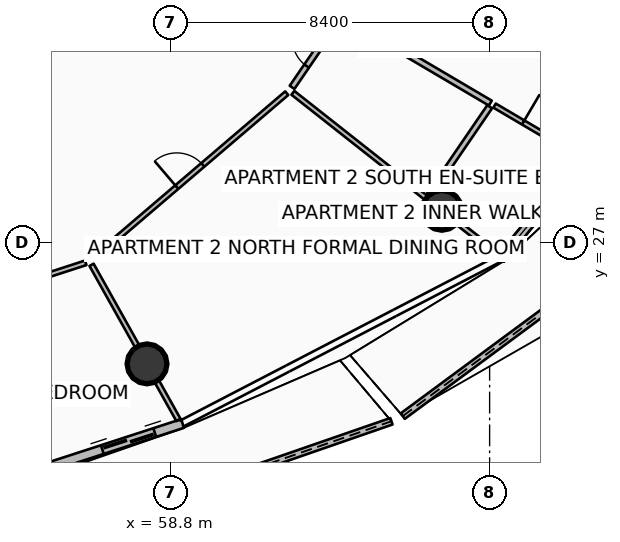
"""IFC4 building model, lengths in metres.
Left out: names, types, materials, properties, quantities, classifications, styles, units other than length and angle.
Written with IfcOpenShell. Run it as: python <this file> out.ifc"""

import sys

from ifc_helpers import new_model, si_unit, direction, frame, frame_2d, origin, origin_2d, place, context, subcontext, project, spatial, polyline, rectangle, circle, outline, extrude, element, fill, save


model = new_model("IFC4")
c1 = context("Model", 3, precision=1e-05, world=origin(), true_north=direction((0.0, 1.0)))
c2 = subcontext(c1, "Body", "Model", "MODEL_VIEW")
j1 = project(units=[si_unit("LENGTHUNIT", "METRE"), si_unit("PLANEANGLEUNIT", "RADIAN")], contexts=[c1])
p1 = place(None, origin())
s1 = spatial("IfcSite", under=j1, at=p1, CompositionType="ELEMENT")
p2 = place(p1, origin())
s2 = spatial("IfcBuilding", under=s1, at=p2, CompositionType="ELEMENT")
p3 = place(p2, frame((0.0, 0.0, 214.05)))
s3 = spatial("IfcBuildingStorey", under=s2, at=p3, CompositionType="ELEMENT", Elevation=214.05)
for number, where, z_axis, x_axis in (
    (1, (58.185, 23.814, 0.0), (0.0, 0.0, 1.0), (1.0, 0.0, 0.0)),
    (2, (65.944, 27.854, 0.0), (0.0, 0.0, 1.0), (1.0, 0.0, 0.0)),
):
    element("IfcColumn", number, at=place(p3, frame(where, z_axis=z_axis, x_axis=x_axis)), inside=s3, PredefinedType="COLUMN", context=c2, shape_type="SweptSolid", body=[
        extrude(circle(Radius=0.525, at=origin_2d()), origin(), (0.0, 0.0, 1.0), 3.5),
    ])
p4 = place(p3, frame((55.547, 19.162, 0.0), z_axis=(0.0, 0.0, 1.0), x_axis=(0.944943422405, 0.327233752007, 0.0)))
e3 = element("IfcWall", 3, at=p4, inside=s3, PredefinedType="PARAPET", context=c2, shape_type="SweptSolid", body=[
    extrude(outline(polyline([(0.0, 0.0), (9.597, 0.0), (9.598, 1.483), (4.799, 1.284), (0.0, 1.148), (0.0, 0.0)])), frame((0.0, 0.09, 0.0), z_axis=(0.0, -1.0, 0.0), x_axis=(1.0, 0.0, 0.0)), (0.0, 0.0, 1.0), 0.18),
])
p5 = place(p3, frame((64.914, 22.439, 0.0), z_axis=(0.0, 0.0, 1.0), x_axis=(0.804266043661, 0.594269409454, 0.0)))
e4 = element("IfcWall", 4, at=p5, inside=s3, PredefinedType="PARAPET", context=c2, shape_type="SweptSolid", body=[
    extrude(outline(polyline([(0.0, 0.0), (10.778, 0.0), (10.778, 1.832), (5.389, 1.696), (0.0, 1.497), (0.0, 0.0)])), frame((0.0, 0.09, 0.0), z_axis=(0.0, -1.0, 0.0), x_axis=(1.0, 0.0, 0.0)), (0.0, 0.0, 1.0), 0.18),
])
p6 = place(p3, frame((50.616, 19.481, 0.0), z_axis=(0.0, 0.0, 1.0), x_axis=(0.951058543936, 0.309010753869, 0.0)))
e5 = element("IfcWall", 5, at=p6, inside=s3, PredefinedType="SOLIDWALL", context=c2, shape_type="SweptSolid", body=[
    extrude(rectangle(XDim=8.942, YDim=0.24, at=frame_2d((4.471, 0.0))), origin(), (0.0, 0.0, 1.0), 2.45),
])
p7 = place(p6, frame((6.722, 0.0, 0.0)))
e6 = element("IfcOpeningElement", 6, at=p7, cuts=e5, PredefinedType="OPENING", context=c2, shape_type="SweptSolid", body=[
    extrude(rectangle(XDim=1.45, YDim=2.15, at=frame_2d((0.725, 1.075))), frame((0.0, 0.13, 0.0), z_axis=(0.0, -1.0, 0.0), x_axis=(1.0, 0.0, 0.0)), (0.0, 0.0, 1.0), 0.26),
])
p8 = place(p6, frame((0.28, 0.0, 0.65)))
e7 = element("IfcOpeningElement", 7, at=p8, cuts=e5, PredefinedType="OPENING", context=c2, shape_type="SweptSolid", body=[
    extrude(rectangle(XDim=1.6, YDim=1.5, at=frame_2d((0.8, 0.75))), frame((0.0, 0.13, 0.0), z_axis=(0.0, -1.0, 0.0), x_axis=(1.0, 0.0, 0.0)), (0.0, 0.0, 1.0), 0.26),
])
p9 = place(p3, frame((67.485, 26.576, 0.0), z_axis=(0.0, 0.0, 1.0), x_axis=(0.636759394418, 0.771062561418, 0.0)))
e8 = element("IfcWall", 8, at=p9, inside=s3, PredefinedType="SOLIDWALL", context=c2, shape_type="SweptSolid", body=[
    extrude(rectangle(XDim=10.494, YDim=0.24, at=frame_2d((5.247, 0.0))), origin(), (0.0, 0.0, 1.0), 2.45),
])
p10 = place(p9, frame((8.274, 0.0, 0.0)))
e9 = element("IfcOpeningElement", 9, at=p10, cuts=e8, PredefinedType="OPENING", context=c2, shape_type="SweptSolid", body=[
    extrude(rectangle(XDim=1.45, YDim=2.15, at=frame_2d((0.725, 1.075))), frame((0.0, 0.13, 0.0), z_axis=(0.0, -1.0, 0.0), x_axis=(1.0, 0.0, 0.0)), (0.0, 0.0, 1.0), 0.26),
])
p11 = place(p9, frame((0.28, 0.0, 0.65)))
e10 = element("IfcOpeningElement", 10, at=p11, cuts=e8, PredefinedType="OPENING", context=c2, shape_type="SweptSolid", body=[
    extrude(rectangle(XDim=1.6, YDim=1.5, at=frame_2d((0.8, 0.75))), frame((0.0, 0.13, 0.0), z_axis=(0.0, -1.0, 0.0), x_axis=(1.0, 0.0, 0.0)), (0.0, 0.0, 1.0), 0.26),
])
p12 = place(p3, frame((50.192, 24.4, 0.0), z_axis=(0.0, 0.0, 1.0), x_axis=(0.951057868445, 0.309012832854, 0.0)))
e11 = element("IfcWall", 11, at=p12, inside=s3, PredefinedType="PARTITIONING", context=c2, shape_type="SweptSolid", body=[
    extrude(rectangle(XDim=6.708, YDim=0.125, at=frame_2d((3.354, 0.0))), origin(), (0.0, 0.0, 1.0), 2.94),
])
p13 = place(p12, frame((2.904, 0.0, 0.0)))
e12 = element("IfcOpeningElement", 12, at=p13, cuts=e11, PredefinedType="OPENING", context=c2, shape_type="SweptSolid", body=[
    extrude(rectangle(XDim=0.9, YDim=2.08, at=frame_2d((0.45, 1.04))), frame((0.0, 0.073, 0.0), z_axis=(0.0, -1.0, 0.0), x_axis=(1.0, 0.0, 0.0)), (0.0, 0.0, 1.0), 0.145),
])
p14 = place(p3, frame((56.725, 26.42, 0.0), z_axis=(0.0, 0.0, 1.0), x_axis=(0.488595423778, -0.872510465189, 0.0)))
e13 = element("IfcWall", 13, at=p14, inside=s3, PredefinedType="PARTITIONING", context=c2, shape_type="SweptSolid", body=[
    extrude(rectangle(XDim=4.678, YDim=0.125, at=frame_2d((2.339, 0.0))), origin(), (0.0, 0.0, 1.0), 2.94),
])
p15 = place(p3, frame((56.76, 26.579, 0.0), z_axis=(0.0, 0.0, 1.0), x_axis=(0.760424223761, 0.649426670161, 0.0)))
e14 = element("IfcWall", 14, at=p15, inside=s3, PredefinedType="PARTITIONING", context=c2, shape_type="SweptSolid", body=[
    extrude(rectangle(XDim=6.708, YDim=0.125, at=frame_2d((3.354, 0.0))), origin(), (0.0, 0.0, 1.0), 2.94),
])
p16 = place(p15, frame((2.904, 0.0, 0.0)))
e15 = element("IfcOpeningElement", 15, at=p16, cuts=e14, PredefinedType="OPENING", context=c2, shape_type="SweptSolid", body=[
    extrude(rectangle(XDim=0.9, YDim=2.08, at=frame_2d((0.45, 1.04))), frame((0.0, 0.073, 0.0), z_axis=(0.0, -1.0, 0.0), x_axis=(1.0, 0.0, 0.0)), (0.0, 0.0, 1.0), 0.145),
])
p17 = place(p3, frame((62.023, 30.945, 0.0), z_axis=(0.0, 0.0, 1.0), x_axis=(0.785321889756, -0.619087658955, 0.0)))
e16 = element("IfcWall", 16, at=p17, inside=s3, PredefinedType="PARTITIONING", context=c2, shape_type="SweptSolid", body=[
    extrude(rectangle(XDim=6.97, YDim=0.125, at=frame_2d((3.485, 0.0))), origin(), (0.0, 0.0, 1.0), 2.94),
])
p18 = place(p3, frame((62.001, 31.089, 0.0), z_axis=(0.0, 0.0, 1.0), x_axis=(0.564616496688, 0.825353385931, 0.0)))
e17 = element("IfcWall", 17, at=p18, inside=s3, PredefinedType="PARTITIONING", context=c2, shape_type="SweptSolid", body=[
    extrude(rectangle(XDim=2.207, YDim=0.15, at=frame_2d((1.104, 0.0))), origin(), (0.0, 0.0, 1.0), 2.94),
])
p19 = place(p18, frame((0.678, 0.0, 0.0)))
e18 = element("IfcOpeningElement", 18, at=p19, cuts=e17, PredefinedType="OPENING", context=c2, shape_type="SweptSolid", body=[
    extrude(rectangle(XDim=0.85, YDim=2.06, at=frame_2d((0.425, 1.03))), frame((0.0, 0.085, 0.0), z_axis=(0.0, -1.0, 0.0), x_axis=(1.0, 0.0, 0.0)), (0.0, 0.0, 1.0), 0.17),
])
p20 = place(p3, frame((65.606, 28.248, 0.0), z_axis=(0.0, 0.0, 1.0), x_axis=(0.564646756592, 0.825332684601, 0.0)))
e19 = element("IfcWall", 19, at=p20, inside=s3, PredefinedType="PARTITIONING", context=c2, shape_type="SweptSolid", body=[
    extrude(rectangle(XDim=2.826, YDim=0.15, at=frame_2d((1.413, 0.0))), origin(), (0.0, 0.0, 1.0), 2.94),
])
p21 = place(p3, frame((63.376, 32.939, 0.0), z_axis=(0.0, 0.0, 1.0), x_axis=(0.86154273728, -0.507685051819, 0.0)))
e20 = element("IfcWall", 20, at=p21, inside=s3, PredefinedType="PARTITIONING", context=c2, shape_type="SweptSolid", body=[
    extrude(rectangle(XDim=4.46, YDim=0.15, at=frame_2d((2.23, 0.0))), origin(), (0.0, 0.0, 1.0), 2.94),
])
p22 = place(p3, frame((67.33, 30.609, 0.0), z_axis=(0.0, 0.0, 1.0), x_axis=(0.861581059631, -0.507620013085, 0.0)))
e21 = element("IfcWall", 21, at=p22, inside=s3, PredefinedType="PARTITIONING", context=c2, shape_type="SweptSolid", body=[
    extrude(rectangle(XDim=2.596, YDim=0.125, at=frame_2d((1.298, 0.0))), origin(), (0.0, 0.0, 1.0), 2.94),
])
p23 = place(p22, frame((0.873, 0.0, 0.0)))
e22 = element("IfcOpeningElement", 22, at=p23, cuts=e21, PredefinedType="OPENING", context=c2, shape_type="SweptSolid", body=[
    extrude(rectangle(XDim=0.85, YDim=2.06, at=frame_2d((0.425, 1.03))), frame((0.0, 0.073, 0.0), z_axis=(0.0, -1.0, 0.0), x_axis=(1.0, 0.0, 0.0)), (0.0, 0.0, 1.0), 0.145),
])
p24 = place(p3, frame((64.412, 34.989, 0.0), z_axis=(0.0, 0.0, 1.0), x_axis=(0.919622074899, -0.392804327061, 0.0)))
e23 = element("IfcWall", 23, at=p24, inside=s3, PredefinedType="PARTITIONING", context=c2, shape_type="SweptSolid", body=[
    extrude(rectangle(XDim=7.93, YDim=0.125, at=frame_2d((3.965, 0.0))), origin(), (0.0, 0.0, 1.0), 2.94),
])
p25 = place(p7, origin())
e24 = element("IfcDoor", 24, at=p25, inside=s3, OperationType="DOUBLE_DOOR_SLIDING", PredefinedType="DOOR", context=c2, shape_type="SweptSolid", body=[
    extrude(rectangle(XDim=1.45, YDim=2.15, at=frame_2d((0.725, 1.075))), frame((0.0, 0.025, 0.0), z_axis=(0.0, -1.0, 0.0), x_axis=(1.0, 0.0, 0.0)), (0.0, 0.0, 1.0), 0.05),
])
fill(e6, e24)
p26 = place(p11, origin())
e25 = element("IfcWindow", 25, at=p26, inside=s3, PartitioningType="SINGLE_PANEL", PredefinedType="WINDOW", context=c2, shape_type="SweptSolid", body=[
    extrude(rectangle(XDim=1.6, YDim=1.5, at=frame_2d((0.8, 0.75))), frame((0.0, 0.03, 0.0), z_axis=(0.0, -1.0, 0.0), x_axis=(1.0, 0.0, 0.0)), (0.0, 0.0, 1.0), 0.06),
])
fill(e10, e25)
p27 = place(p16, origin())
e26 = element("IfcDoor", 26, at=p27, inside=s3, OperationType="SINGLE_SWING_LEFT", PredefinedType="DOOR", context=c2, shape_type="SweptSolid", body=[
    extrude(rectangle(XDim=0.9, YDim=2.08, at=frame_2d((0.45, 1.04))), frame((0.0, 0.025, 0.0), z_axis=(0.0, -1.0, 0.0), x_axis=(1.0, 0.0, 0.0)), (0.0, 0.0, 1.0), 0.05),
])
fill(e15, e26)
p28 = place(p19, origin())
e27 = element("IfcDoor", 27, at=p28, inside=s3, OperationType="SINGLE_SWING_RIGHT", PredefinedType="DOOR", context=c2, shape_type="SweptSolid", body=[
    extrude(rectangle(XDim=0.85, YDim=2.06, at=frame_2d((0.425, 1.03))), frame((0.0, 0.025, 0.0), z_axis=(0.0, -1.0, 0.0), x_axis=(1.0, 0.0, 0.0)), (0.0, 0.0, 1.0), 0.05),
])
fill(e18, e27)
p29 = place(p23, origin())
e28 = element("IfcDoor", 28, at=p29, inside=s3, OperationType="SINGLE_SWING_LEFT", PredefinedType="DOOR", context=c2, shape_type="SweptSolid", body=[
    extrude(rectangle(XDim=0.85, YDim=2.06, at=frame_2d((0.425, 1.03))), frame((0.0, 0.025, 0.0), z_axis=(0.0, -1.0, 0.0), x_axis=(1.0, 0.0, 0.0)), (0.0, 0.0, 1.0), 0.05),
])
fill(e22, e28)
save(model, sys.argv[1])
